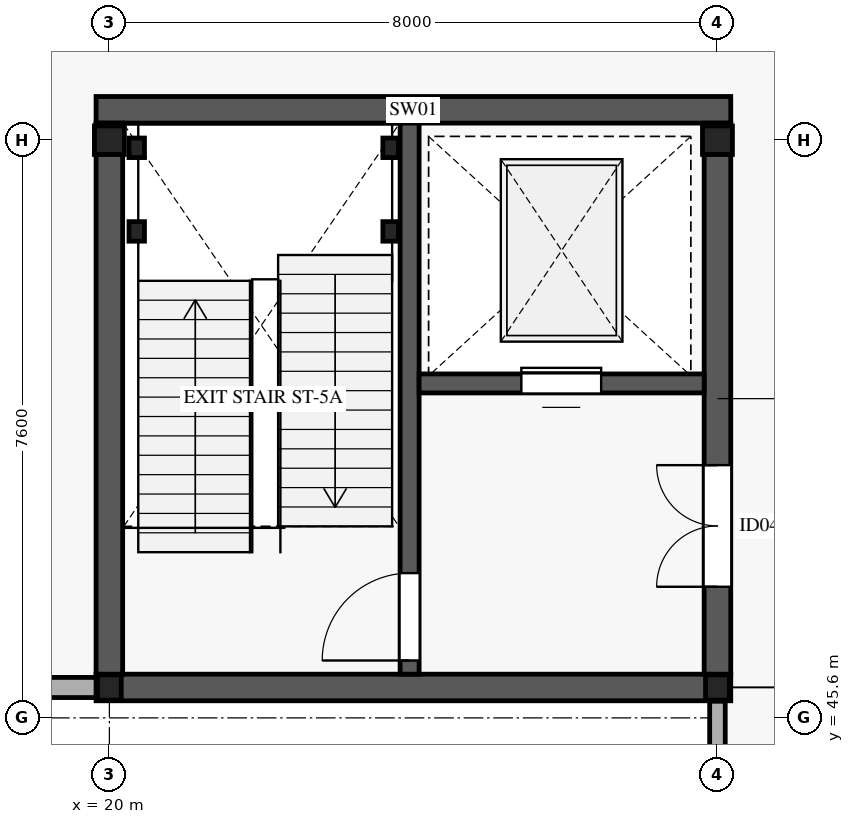
"""IFC4 building model, lengths in metres.
Left out: names, types, materials, properties, quantities, classifications, styles, units other than length and angle.
Written with IfcOpenShell. Run it as: python <this file> out.ifc"""

import sys

from ifc_helpers import new_model, si_unit, direction, frame, frame_2d, origin, origin_2d, place, context, subcontext, project, spatial, rectangle, i_section, extrude, element, fill, save


model = new_model("IFC4")
c1 = context("Model", 3, precision=1e-05, world=origin(), true_north=direction((0.0, 1.0)))
c2 = subcontext(c1, "Body", "Model", "MODEL_VIEW")
j1 = project(units=[si_unit("LENGTHUNIT", "METRE"), si_unit("PLANEANGLEUNIT", "RADIAN")], contexts=[c1])
p1 = place(None, origin())
s1 = spatial("IfcSite", under=j1, at=p1, CompositionType="ELEMENT")
p2 = place(p1, origin())
s2 = spatial("IfcBuilding", under=s1, at=p2, CompositionType="ELEMENT")
p3 = place(p2, frame((0.0, 0.0, 5.4)))
s3 = spatial("IfcBuildingStorey", under=s2, at=p3, CompositionType="ELEMENT", Elevation=5.4)
p4 = place(p3, frame((20.0, 46.0, 0.0), z_axis=(0.0, 0.0, 1.0), x_axis=(1.0, 0.0, 0.0)))
e1 = element("IfcColumn", 1, at=p4, inside=s3, PredefinedType="COLUMN", context=c2, shape_type="SweptSolid", body=[
    extrude(i_section(OverallWidth=0.313, OverallDepth=0.333, WebThickness=0.018, FlangeThickness=0.028, FilletRadius=0.015, at=origin_2d()), origin(), (0.0, 0.0, 1.0), 5.185),
])
p5 = place(p3, frame((20.0, 53.2, 0.0), z_axis=(0.0, 0.0, 1.0), x_axis=(1.0, 0.0, 0.0)))
e2 = element("IfcColumn", 2, at=p5, inside=s3, PredefinedType="COLUMN", context=c2, shape_type="SweptSolid", body=[
    extrude(i_section(OverallWidth=0.394, OverallDepth=0.376, WebThickness=0.017, FlangeThickness=0.028, FilletRadius=0.015, at=origin_2d()), origin(), (0.0, 0.0, 1.0), 5.185),
])
p6 = place(p3, frame((28.0, 46.0, 0.0), z_axis=(0.0, 0.0, 1.0), x_axis=(1.0, 0.0, 0.0)))
e3 = element("IfcColumn", 3, at=p6, inside=s3, PredefinedType="COLUMN", context=c2, shape_type="SweptSolid", body=[
    extrude(i_section(OverallWidth=0.313, OverallDepth=0.333, WebThickness=0.018, FlangeThickness=0.028, FilletRadius=0.015, at=origin_2d()), origin(), (0.0, 0.0, 1.0), 5.185),
])
p7 = place(p3, frame((28.0, 53.2, 0.0), z_axis=(0.0, 0.0, 1.0), x_axis=(1.0, 0.0, 0.0)))
e4 = element("IfcColumn", 4, at=p7, inside=s3, PredefinedType="COLUMN", context=c2, shape_type="SweptSolid", body=[
    extrude(i_section(OverallWidth=0.394, OverallDepth=0.376, WebThickness=0.017, FlangeThickness=0.028, FilletRadius=0.015, at=origin_2d()), origin(), (0.0, 0.0, 1.0), 5.185),
])
p8 = place(p3, frame((20.02, 46.0, 0.0), z_axis=(0.0, 0.0, 1.0), x_axis=(-1.0, 0.0, 0.0)))
e5 = element("IfcWall", 5, at=p8, inside=s3, PredefinedType="STANDARD", context=c2, shape_type="SweptSolid", body=[
    extrude(rectangle(XDim=8.04, YDim=0.265, at=frame_2d((4.02, 0.0))), origin(), (0.0, 0.0, 1.0), 4.25),
])
p9 = place(p8, frame((2.22, 0.0, 0.75)))
e6 = element("IfcOpeningElement", 6, at=p9, cuts=e5, PredefinedType="OPENING", context=c2, shape_type="SweptSolid", body=[
    extrude(rectangle(XDim=3.6, YDim=2.15, at=frame_2d((1.8, 1.075))), frame((0.0, 0.142, 0.0), z_axis=(0.0, -1.0, 0.0), x_axis=(1.0, 0.0, 0.0)), (0.0, 0.0, 1.0), 0.285),
])
p10 = place(p3, frame((28.0, 22.98, 0.0), z_axis=(0.0, 0.0, 1.0), x_axis=(0.0, 1.0, 0.0)))
e7 = element("IfcWall", 7, at=p10, inside=s3, PredefinedType="STANDARD", context=c2, shape_type="SweptSolid", body=[
    extrude(rectangle(XDim=22.84, YDim=0.205, at=frame_2d((11.42, 0.0))), origin(), (0.0, 0.0, 1.0), 4.62),
])
p11 = place(p10, frame((10.195, 0.0, 0.85)))
e8 = element("IfcOpeningElement", 8, at=p11, cuts=e7, PredefinedType="OPENING", context=c2, shape_type="SweptSolid", body=[
    extrude(rectangle(XDim=2.45, YDim=1.55, at=frame_2d((1.225, 0.775))), frame((0.0, 0.113, 0.0), z_axis=(0.0, -1.0, 0.0), x_axis=(1.0, 0.0, 0.0)), (0.0, 0.0, 1.0), 0.225),
])
for number, where, z_axis, x_axis in (
    (9, (19.825, 46.0, 0.0), (0.0, 0.0, 1.0), (1.0, 0.0, 0.0)),
    (10, (19.825, 53.6, 0.0), (0.0, 0.0, 1.0), (1.0, 0.0, 0.0)),
):
    element("IfcWall", number, at=place(p3, frame(where, z_axis=z_axis, x_axis=x_axis)), inside=s3, PredefinedType="SHEAR", context=c2, shape_type="SweptSolid", body=[
        extrude(rectangle(XDim=8.35, YDim=0.35, at=frame_2d((4.175, 0.0))), origin(), (0.0, 0.0, 1.0), 5.19),
    ])
p12 = place(p3, frame((20.0, 46.175, 0.0), z_axis=(0.0, 0.0, 1.0), x_axis=(0.0, 1.0, 0.0)))
e11 = element("IfcWall", 11, at=p12, inside=s3, PredefinedType="SHEAR", context=c2, shape_type="SweptSolid", body=[
    extrude(rectangle(XDim=7.25, YDim=0.35, at=frame_2d((3.625, 0.0))), origin(), (0.0, 0.0, 1.0), 5.19),
])
p13 = place(p3, frame((28.0, 46.175, 0.0), z_axis=(0.0, 0.0, 1.0), x_axis=(0.0, 1.0, 0.0)))
e12 = element("IfcWall", 12, at=p13, inside=s3, PredefinedType="SHEAR", context=c2, shape_type="SweptSolid", body=[
    extrude(rectangle(XDim=7.25, YDim=0.35, at=frame_2d((3.625, 0.0))), origin(), (0.0, 0.0, 1.0), 5.19),
])
p14 = place(p13, frame((1.15, 0.0, 0.0)))
e13 = element("IfcOpeningElement", 13, at=p14, cuts=e12, PredefinedType="OPENING", context=c2, shape_type="SweptSolid", body=[
    extrude(rectangle(XDim=1.6, YDim=2.35, at=frame_2d((0.8, 1.175))), frame((0.0, 0.185, 0.0), z_axis=(0.0, -1.0, 0.0), x_axis=(1.0, 0.0, 0.0)), (0.0, 0.0, 1.0), 0.37),
])
p15 = place(p3, frame((23.95, 46.175, 0.0), z_axis=(0.0, 0.0, 1.0), x_axis=(0.0, 1.0, 0.0)))
e14 = element("IfcWall", 14, at=p15, inside=s3, PredefinedType="SHEAR", context=c2, shape_type="SweptSolid", body=[
    extrude(rectangle(XDim=7.25, YDim=0.25, at=frame_2d((3.625, 0.0))), origin(), (0.0, 0.0, 1.0), 5.19),
])
p16 = place(p15, frame((0.18, 0.0, 0.0)))
e15 = element("IfcOpeningElement", 15, at=p16, cuts=e14, PredefinedType="OPENING", context=c2, shape_type="SweptSolid", body=[
    extrude(rectangle(XDim=1.15, YDim=2.2, at=frame_2d((0.575, 1.1))), frame((0.0, 0.135, 0.0), z_axis=(0.0, -1.0, 0.0), x_axis=(1.0, 0.0, 0.0)), (0.0, 0.0, 1.0), 0.27),
])
p17 = place(p3, frame((24.075, 50.0, 0.0), z_axis=(0.0, 0.0, 1.0), x_axis=(1.0, 0.0, 0.0)))
e16 = element("IfcWall", 16, at=p17, inside=s3, PredefinedType="SHEAR", context=c2, shape_type="SweptSolid", body=[
    extrude(rectangle(XDim=3.75, YDim=0.25, at=frame_2d((1.875, 0.0))), origin(), (0.0, 0.0, 1.0), 5.19),
])
p18 = place(p17, frame((1.345, 0.0, 0.0)))
e17 = element("IfcOpeningElement", 17, at=p18, cuts=e16, PredefinedType="OPENING", context=c2, shape_type="SweptSolid", body=[
    extrude(rectangle(XDim=1.05, YDim=2.2, at=frame_2d((0.525, 1.1))), frame((0.0, 0.135, 0.0), z_axis=(0.0, -1.0, 0.0), x_axis=(1.0, 0.0, 0.0)), (0.0, 0.0, 1.0), 0.27),
])
for number, where, z_axis, x_axis in (
    (18, (20.36, 52.0, 0.0), (0.0, 0.0, 1.0), (1.0, 0.0, 0.0)),
    (19, (23.7, 52.0, 0.0), (0.0, 0.0, 1.0), (1.0, 0.0, 0.0)),
    (20, (20.36, 53.1, 0.0), (0.0, 0.0, 1.0), (1.0, 0.0, 0.0)),
    (21, (23.7, 53.1, 0.0), (0.0, 0.0, 1.0), (1.0, 0.0, 0.0)),
):
    element("IfcColumn", number, at=place(p3, frame(where, z_axis=z_axis, x_axis=x_axis)), inside=s3, PredefinedType="COLUMN", context=c2, shape_type="SweptSolid", body=[
        extrude(i_section(OverallWidth=0.204, OverallDepth=0.257, WebThickness=0.009, FlangeThickness=0.016, FilletRadius=0.013, at=origin_2d()), origin(), (0.0, 0.0, 1.0), 5.395),
    ])
p19 = place(p16, origin())
e22 = element("IfcDoor", 22, at=p19, inside=s3, OperationType="SINGLE_SWING_LEFT", PredefinedType="DOOR", context=c2, shape_type="SweptSolid", body=[
    extrude(rectangle(XDim=1.15, YDim=2.2, at=frame_2d((0.575, 1.1))), frame((0.0, 0.025, 0.0), z_axis=(0.0, -1.0, 0.0), x_axis=(1.0, 0.0, 0.0)), (0.0, 0.0, 1.0), 0.05),
])
fill(e15, e22)
p20 = place(p14, origin())
e23 = element("IfcDoor", 23, at=p20, inside=s3, OperationType="DOUBLE_DOOR_SINGLE_SWING", PredefinedType="DOOR", context=c2, shape_type="SweptSolid", body=[
    extrude(rectangle(XDim=1.6, YDim=2.35, at=frame_2d((0.8, 1.175))), frame((0.0, 0.025, 0.0), z_axis=(0.0, -1.0, 0.0), x_axis=(1.0, 0.0, 0.0)), (0.0, 0.0, 1.0), 0.05),
])
fill(e13, e23)
p21 = place(p18, origin())
e24 = element("IfcDoor", 24, at=p21, inside=s3, OperationType="SLIDING_TO_RIGHT", PredefinedType="DOOR", context=c2, shape_type="SweptSolid", body=[
    extrude(rectangle(XDim=1.05, YDim=2.2, at=frame_2d((0.525, 1.1))), frame((0.0, 0.025, 0.0), z_axis=(0.0, -1.0, 0.0), x_axis=(1.0, 0.0, 0.0)), (0.0, 0.0, 1.0), 0.05),
])
fill(e17, e24)
save(model, sys.argv[1])
